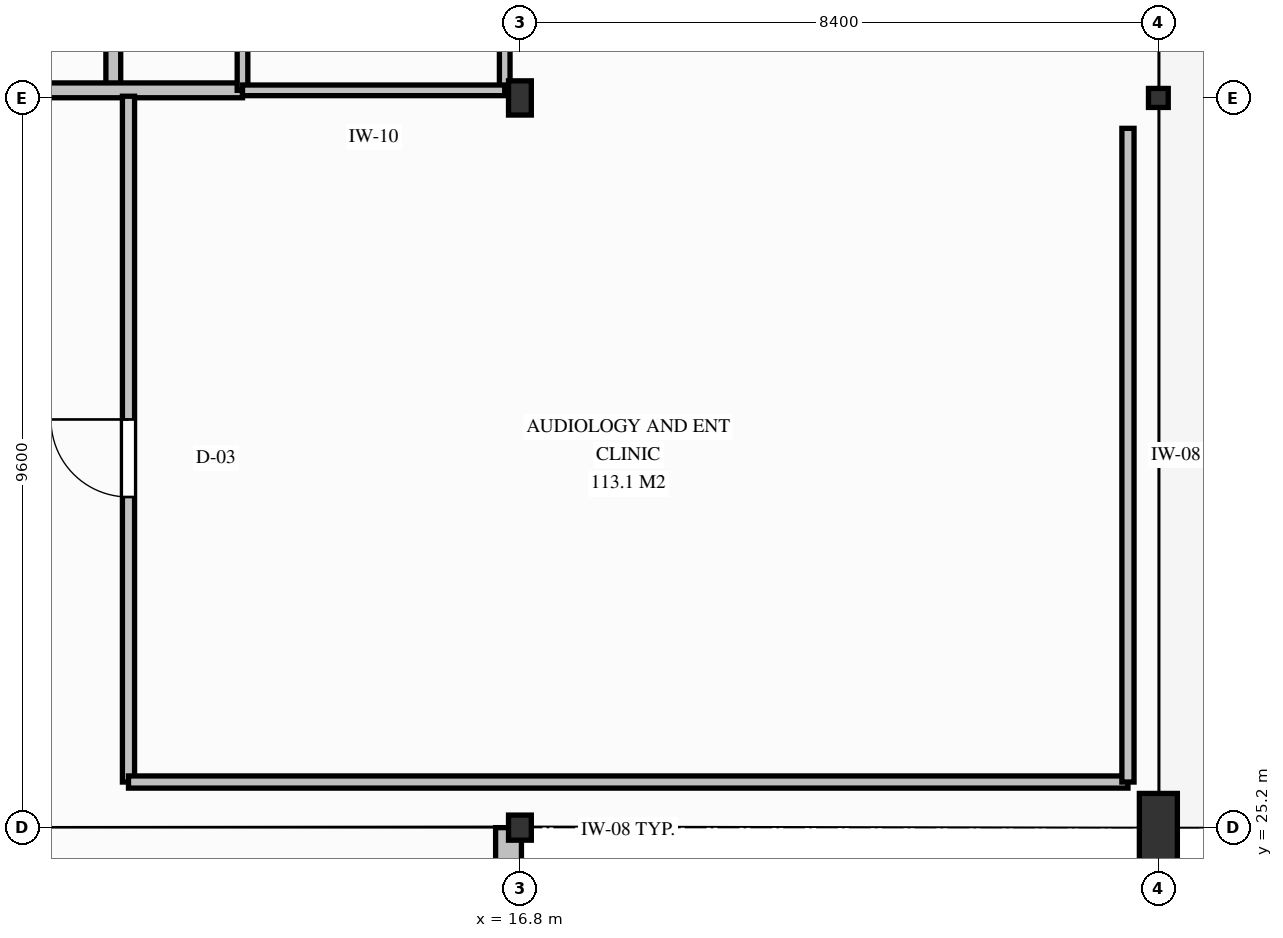
"""IFC4 building model, lengths in metres.
Left out: names, types, materials, properties, quantities, classifications, styles, units other than length and angle.
Written with IfcOpenShell. Run it as: python <this file> out.ifc"""

import sys

from ifc_helpers import new_model, si_unit, direction, frame, frame_2d, origin, origin_2d, place, context, subcontext, project, spatial, rectangle, i_section, extrude, element, fill, save


model = new_model("IFC4")
c1 = context("Model", 3, precision=1e-05, world=origin(), true_north=direction((0.0, 1.0)))
c2 = subcontext(c1, "Body", "Model", "MODEL_VIEW")
j1 = project(units=[si_unit("LENGTHUNIT", "METRE"), si_unit("PLANEANGLEUNIT", "RADIAN")], contexts=[c1])
p1 = place(None, origin())
s1 = spatial("IfcSite", under=j1, at=p1, CompositionType="ELEMENT")
p2 = place(p1, origin())
s2 = spatial("IfcBuilding", under=s1, at=p2, CompositionType="ELEMENT")
p3 = place(p2, frame((0.0, 0.0, 9.0)))
s3 = spatial("IfcBuildingStorey", under=s2, at=p3, CompositionType="ELEMENT", Elevation=9.0)
p4 = place(p3, frame((16.8, 25.2, 0.0), z_axis=(0.0, 0.0, 1.0), x_axis=(1.0, 0.0, 0.0)))
e1 = element("IfcColumn", 1, at=p4, inside=s3, PredefinedType="COLUMN", context=c2, shape_type="SweptSolid", body=[
    extrude(i_section(OverallWidth=0.3, OverallDepth=0.33, WebThickness=0.01, FlangeThickness=0.017, FilletRadius=0.027, at=origin_2d()), origin(), (0.0, 0.0, 1.0), 4.2),
])
p5 = place(p3, frame((16.8, 34.8, 0.0), z_axis=(0.0, 0.0, 1.0), x_axis=(1.0, 0.0, 0.0)))
e2 = element("IfcColumn", 2, at=p5, inside=s3, PredefinedType="COLUMN", context=c2, shape_type="SweptSolid", body=[
    extrude(i_section(OverallWidth=0.3, OverallDepth=0.45, WebThickness=0.014, FlangeThickness=0.026, FilletRadius=0.027, at=origin_2d()), origin(), (0.0, 0.0, 1.0), 4.2),
])
p6 = place(p3, frame((25.2, 25.2, 0.0), z_axis=(0.0, 0.0, 1.0), x_axis=(1.0, 0.0, 0.0)))
e3 = element("IfcColumn", 3, at=p6, inside=s3, PredefinedType="COLUMN", context=c2, shape_type="SweptSolid", body=[
    extrude(rectangle(XDim=0.5, YDim=0.9, at=origin_2d()), origin(), (0.0, 0.0, 1.0), 4.55),
])
p7 = place(p3, frame((25.2, 34.8, 0.0), z_axis=(0.0, 0.0, 1.0), x_axis=(1.0, 0.0, 0.0)))
e4 = element("IfcColumn", 4, at=p7, inside=s3, PredefinedType="COLUMN", context=c2, shape_type="SweptSolid", body=[
    extrude(i_section(OverallWidth=0.26, OverallDepth=0.25, WebThickness=0.008, FlangeThickness=0.012, FilletRadius=0.024, at=origin_2d()), origin(), (0.0, 0.0, 1.0), 4.55),
])
p8 = place(p3, frame((16.65, 25.2, 0.0), z_axis=(0.0, 0.0, 1.0), x_axis=(0.0, -1.0, 0.0)))
e5 = element("IfcWall", 5, at=p8, inside=s3, PredefinedType="SOLIDWALL", context=c2, shape_type="SweptSolid", body=[
    extrude(rectangle(XDim=8.4, YDim=0.34, at=frame_2d((4.2, 0.0))), origin(), (0.0, 0.0, 1.0), 3.468),
])
p9 = place(p8, frame((3.025, 0.0, 0.85)))
e6 = element("IfcOpeningElement", 6, at=p9, cuts=e5, PredefinedType="OPENING", context=c2, shape_type="SweptSolid", body=[
    extrude(rectangle(XDim=2.35, YDim=1.8, at=frame_2d((1.175, 0.9))), frame((0.0, 0.18, 0.0), z_axis=(0.0, -1.0, 0.0), x_axis=(1.0, 0.0, 0.0)), (0.0, 0.0, 1.0), 0.36),
])
p10 = place(p3, frame((11.45, 34.9, 0.0), z_axis=(0.0, 0.0, 1.0), x_axis=(0.0, 1.0, 0.0)))
e7 = element("IfcWall", 7, at=p10, inside=s3, PredefinedType="PARTITIONING", context=c2, shape_type="SweptSolid", body=[
    extrude(rectangle(XDim=2.65, YDim=0.195, at=frame_2d((1.325, 0.0))), origin(), (0.0, 0.0, 1.0), 3.538),
])
p11 = place(p3, frame((8.35, 34.9, 0.0), z_axis=(0.0, 0.0, 1.0), x_axis=(1.0, 0.0, 0.0)))
e8 = element("IfcWall", 8, at=p11, inside=s3, PredefinedType="PARTITIONING", context=c2, shape_type="SweptSolid", body=[
    extrude(rectangle(XDim=4.8, YDim=0.195, at=frame_2d((2.4, 0.0))), origin(), (0.0, 0.0, 1.0), 3.488),
])
p12 = place(p11, frame((1.05, 0.0, 0.0)))
e9 = element("IfcOpeningElement", 9, at=p12, cuts=e8, PredefinedType="OPENING", context=c2, shape_type="SweptSolid", body=[
    extrude(rectangle(XDim=1.1, YDim=2.15, at=frame_2d((0.55, 1.075))), frame((0.0, 0.107, 0.0), z_axis=(0.0, -1.0, 0.0), x_axis=(1.0, 0.0, 0.0)), (0.0, 0.0, 1.0), 0.215),
])
p13 = place(p3, frame((13.15, 34.9, 0.0), z_axis=(0.0, 0.0, 1.0), x_axis=(0.0, 1.0, 0.0)))
e10 = element("IfcWall", 10, at=p13, inside=s3, PredefinedType="PARTITIONING", context=c2, shape_type="SweptSolid", body=[
    extrude(rectangle(XDim=7.82, YDim=0.14, at=frame_2d((3.91, 0.0))), origin(), (0.0, 0.0, 1.0), 3.538),
])
p14 = place(p13, frame((0.9, 0.0, 0.0)))
e11 = element("IfcOpeningElement", 11, at=p14, cuts=e10, PredefinedType="OPENING", context=c2, shape_type="SweptSolid", body=[
    extrude(rectangle(XDim=0.95, YDim=2.12, at=frame_2d((0.475, 1.06))), frame((0.0, 0.08, 0.0), z_axis=(0.0, -1.0, 0.0), x_axis=(1.0, 0.0, 0.0)), (0.0, 0.0, 1.0), 0.16),
])
p15 = place(p13, frame((3.55, 0.0, 0.0)))
e12 = element("IfcOpeningElement", 12, at=p15, cuts=e10, PredefinedType="OPENING", context=c2, shape_type="SweptSolid", body=[
    extrude(rectangle(XDim=0.98, YDim=2.14, at=frame_2d((0.49, 1.07))), frame((0.0, 0.08, 0.0), z_axis=(0.0, -1.0, 0.0), x_axis=(1.0, 0.0, 0.0)), (0.0, 0.0, 1.0), 0.16),
])
p16 = place(p13, frame((6.08, 0.0, 0.0)))
e13 = element("IfcOpeningElement", 13, at=p16, cuts=e10, PredefinedType="OPENING", context=c2, shape_type="SweptSolid", body=[
    extrude(rectangle(XDim=0.98, YDim=2.14, at=frame_2d((0.49, 1.07))), frame((0.0, 0.08, 0.0), z_axis=(0.0, -1.0, 0.0), x_axis=(1.0, 0.0, 0.0)), (0.0, 0.0, 1.0), 0.16),
])
p17 = place(p3, frame((16.6, 34.9, 0.0), z_axis=(0.0, 0.0, 1.0), x_axis=(0.0, 1.0, 0.0)))
e14 = element("IfcWall", 14, at=p17, inside=s3, PredefinedType="PARTITIONING", context=c2, shape_type="SweptSolid", body=[
    extrude(rectangle(XDim=7.82, YDim=0.14, at=frame_2d((3.91, 0.0))), origin(), (0.0, 0.0, 1.0), 3.538),
])
p18 = place(p3, frame((13.15, 34.9, 0.0), z_axis=(0.0, 0.0, 1.0), x_axis=(1.0, 0.0, 0.0)))
e15 = element("IfcWall", 15, at=p18, inside=s3, PredefinedType="PARTITIONING", context=c2, shape_type="SweptSolid", body=[
    extrude(rectangle(XDim=3.45, YDim=0.14, at=frame_2d((1.725, 0.0))), origin(), (0.0, 0.0, 1.0), 3.538),
])
p19 = place(p3, frame((11.65, 25.8, 0.0), z_axis=(0.0, 0.0, 1.0), x_axis=(0.0, 1.0, 0.0)))
e16 = element("IfcWall", 16, at=p19, inside=s3, PredefinedType="PARTITIONING", context=c2, shape_type="SweptSolid", body=[
    extrude(rectangle(XDim=9.022, YDim=0.16, at=frame_2d((4.511, 0.0))), origin(), (0.0, 0.0, 1.0), 3.538),
])
p20 = place(p19, frame((3.75, 0.0, 0.0)))
e17 = element("IfcOpeningElement", 17, at=p20, cuts=e16, PredefinedType="OPENING", context=c2, shape_type="SweptSolid", body=[
    extrude(rectangle(XDim=1.02, YDim=2.15, at=frame_2d((0.51, 1.075))), frame((0.0, 0.09, 0.0), z_axis=(0.0, -1.0, 0.0), x_axis=(1.0, 0.0, 0.0)), (0.0, 0.0, 1.0), 0.18),
])
p21 = place(p3, frame((24.8, 25.8, 0.0), z_axis=(0.0, 0.0, 1.0), x_axis=(-1.0, 0.0, 0.0)))
e18 = element("IfcWall", 18, at=p21, inside=s3, PredefinedType="PARTITIONING", context=c2, shape_type="SweptSolid", body=[
    extrude(rectangle(XDim=13.15, YDim=0.16, at=frame_2d((6.575, 0.0))), origin(), (0.0, 0.0, 1.0), 3.578),
])
p22 = place(p3, frame((24.8, 34.4, 0.0), z_axis=(0.0, 0.0, 1.0), x_axis=(0.0, -1.0, 0.0)))
e19 = element("IfcWall", 19, at=p22, inside=s3, PredefinedType="PARTITIONING", context=c2, shape_type="SweptSolid", body=[
    extrude(rectangle(XDim=8.6, YDim=0.16, at=frame_2d((4.3, 0.0))), origin(), (0.0, 0.0, 1.0), 3.93),
])
p23 = place(p20, origin())
e20 = element("IfcDoor", 20, at=p23, inside=s3, OperationType="SINGLE_SWING_RIGHT", PredefinedType="DOOR", context=c2, shape_type="SweptSolid", body=[
    extrude(rectangle(XDim=1.02, YDim=2.15, at=frame_2d((0.51, 1.075))), frame((0.0, 0.025, 0.0), z_axis=(0.0, -1.0, 0.0), x_axis=(1.0, 0.0, 0.0)), (0.0, 0.0, 1.0), 0.05),
])
fill(e17, e20)
save(model, sys.argv[1])
